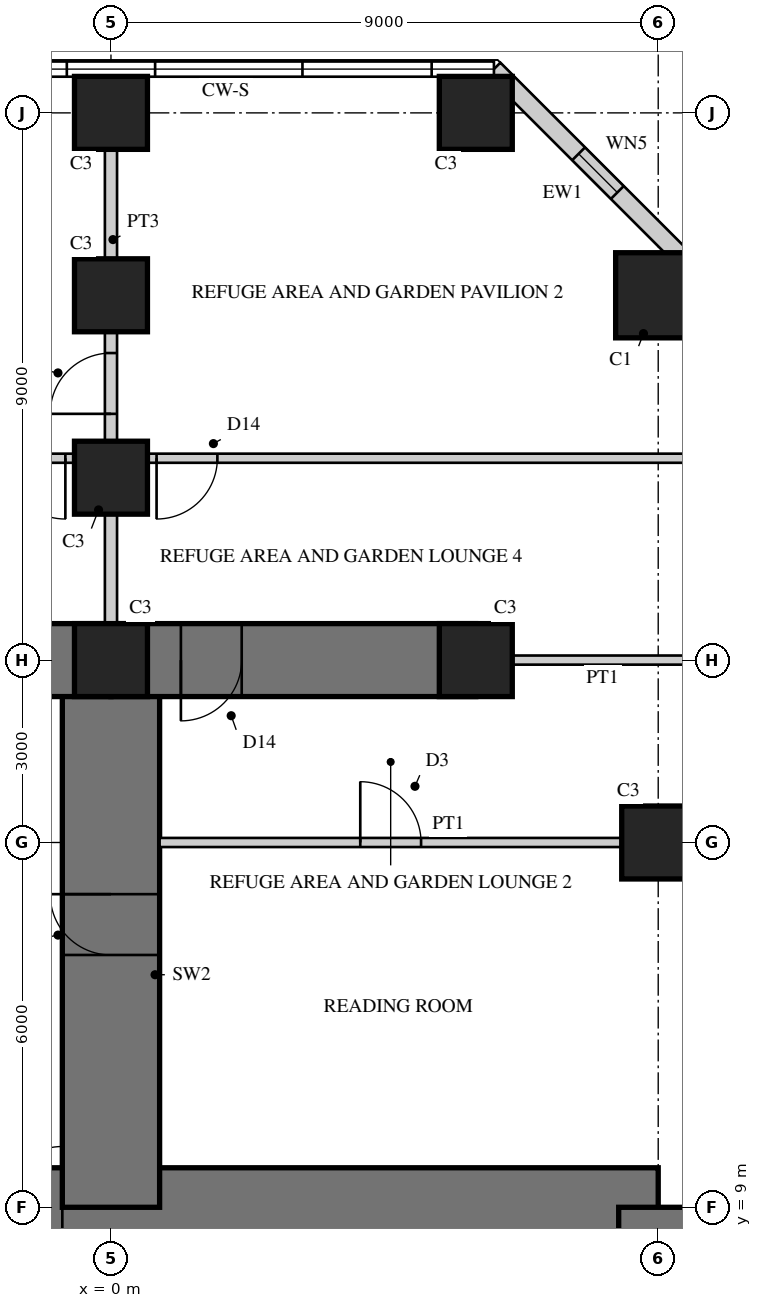
"""IFC4 building model, lengths in metres.
Left out: names, types, materials, properties, quantities, classifications, styles, units other than length and angle.
Written with IfcOpenShell. Run it as: python <this file> out.ifc"""

import sys

from ifc_helpers import new_model, si_unit, direction, frame, frame_2d, origin, origin_2d, place, context, subcontext, project, spatial, rectangle, hollow_rectangle, extrude, element, fill, save


model = new_model("IFC4")
c1 = context("Model", 3, precision=1e-05, world=origin(), true_north=direction((0.0, 1.0)))
c2 = subcontext(c1, "Body", "Model", "MODEL_VIEW")
j1 = project(units=[si_unit("LENGTHUNIT", "METRE"), si_unit("PLANEANGLEUNIT", "RADIAN")], contexts=[c1])
p1 = place(None, origin())
s1 = spatial("IfcSite", under=j1, at=p1, CompositionType="ELEMENT")
p2 = place(p1, origin())
s2 = spatial("IfcBuilding", under=s1, at=p2, CompositionType="ELEMENT")
p3 = place(p2, frame((0.0, 0.0, 95.5)))
s3 = spatial("IfcBuildingStorey", under=s2, at=p3, CompositionType="ELEMENT", Elevation=95.5)
p4 = place(p3, frame((9.0, 9.0, 0.0), z_axis=(0.0, 0.0, 1.0), x_axis=(-1.0, 0.0, 0.0)))
e1 = element("IfcWall", 1, at=p4, inside=s3, PredefinedType="SHEAR", context=c2, shape_type="SweptSolid", body=[
    extrude(rectangle(XDim=18.0, YDim=1.3, at=frame_2d((9.0, 0.0))), origin(), (0.0, 0.0, 1.0), 5.0),
])
p5 = place(p4, frame((9.8, 0.0, 0.0)))
e2 = element("IfcOpeningElement", 2, at=p5, cuts=e1, PredefinedType="OPENING", context=c2, shape_type="SweptSolid", body=[
    extrude(rectangle(XDim=1.0, YDim=2.4, at=frame_2d((0.5, 1.2))), frame((0.0, 0.66, 0.0), z_axis=(0.0, -1.0, 0.0), x_axis=(1.0, 0.0, 0.0)), (0.0, 0.0, 1.0), 1.32),
])
p6 = place(p3, frame((9.0, -9.0, 0.0), z_axis=(0.0, 0.0, 1.0), x_axis=(0.0, 1.0, 0.0)))
e3 = element("IfcWall", 3, at=p6, inside=s3, PredefinedType="SHEAR", context=c2, shape_type="SweptSolid", body=[
    extrude(rectangle(XDim=18.0, YDim=1.3, at=frame_2d((9.0, 0.0))), origin(), (0.0, 0.0, 1.0), 5.0),
])
p7 = place(p6, frame((9.8, 0.0, 0.0)))
e4 = element("IfcOpeningElement", 4, at=p7, cuts=e3, PredefinedType="OPENING", context=c2, shape_type="SweptSolid", body=[
    extrude(rectangle(XDim=1.0, YDim=2.4, at=frame_2d((0.5, 1.2))), frame((0.0, 0.66, 0.0), z_axis=(0.0, -1.0, 0.0), x_axis=(1.0, 0.0, 0.0)), (0.0, 0.0, 1.0), 1.32),
])
p8 = place(p3, frame((0.0, 9.0, 0.0), z_axis=(0.0, 0.0, 1.0), x_axis=(0.0, 1.0, 0.0)))
e5 = element("IfcWall", 5, at=p8, inside=s3, PredefinedType="SHEAR", context=c2, shape_type="SweptSolid", body=[
    extrude(rectangle(XDim=9.0, YDim=1.6, at=frame_2d((4.5, 0.0))), origin(), (0.0, 0.0, 1.0), 5.0),
])
p9 = place(p8, frame((4.15, 0.0, 0.0)))
e6 = element("IfcOpeningElement", 6, at=p9, cuts=e5, PredefinedType="OPENING", context=c2, shape_type="SweptSolid", body=[
    extrude(rectangle(XDim=1.0, YDim=2.2, at=frame_2d((0.5, 1.1))), frame((0.0, 0.81, 0.0), z_axis=(0.0, -1.0, 0.0), x_axis=(1.0, 0.0, 0.0)), (0.0, 0.0, 1.0), 1.62),
])
p10 = place(p3, frame((0.0, 18.0, 0.0), z_axis=(0.0, 0.0, 1.0), x_axis=(-1.0, 0.0, 0.0)))
e7 = element("IfcWall", 7, at=p10, inside=s3, PredefinedType="SHEAR", context=c2, shape_type="SweptSolid", body=[
    extrude(rectangle(XDim=6.0, YDim=1.2, at=frame_2d((3.0, 0.0))), origin(), (0.0, 0.0, 1.0), 5.0),
])
p11 = place(p10, frame((1.15, 0.0, 0.0)))
e8 = element("IfcOpeningElement", 8, at=p11, cuts=e7, PredefinedType="OPENING", context=c2, shape_type="SweptSolid", body=[
    extrude(rectangle(XDim=1.0, YDim=2.2, at=frame_2d((0.5, 1.1))), frame((0.0, 0.61, 0.0), z_axis=(0.0, -1.0, 0.0), x_axis=(1.0, 0.0, 0.0)), (0.0, 0.0, 1.0), 1.22),
])
p12 = place(p3, frame((0.0, 18.0, 0.0), z_axis=(0.0, 0.0, 1.0), x_axis=(1.0, 0.0, 0.0)))
e9 = element("IfcWall", 9, at=p12, inside=s3, PredefinedType="SHEAR", context=c2, shape_type="SweptSolid", body=[
    extrude(rectangle(XDim=6.0, YDim=1.2, at=frame_2d((3.0, 0.0))), origin(), (0.0, 0.0, 1.0), 5.0),
])
p13 = place(p12, frame((1.15, 0.0, 0.0)))
e10 = element("IfcOpeningElement", 10, at=p13, cuts=e9, PredefinedType="OPENING", context=c2, shape_type="SweptSolid", body=[
    extrude(rectangle(XDim=1.0, YDim=2.2, at=frame_2d((0.5, 1.1))), frame((0.0, 0.61, 0.0), z_axis=(0.0, -1.0, 0.0), x_axis=(1.0, 0.0, 0.0)), (0.0, 0.0, 1.0), 1.22),
])
p14 = place(p3, frame((9.0, 15.0, 0.0), z_axis=(0.0, 0.0, 1.0), x_axis=(1.0, 0.0, 0.0)))
e11 = element("IfcColumn", 11, at=p14, inside=s3, PredefinedType="COLUMN", context=c2, shape_type="SweptSolid", body=[
    extrude(rectangle(XDim=1.2, YDim=1.2, at=origin_2d()), origin(), (0.0, 0.0, 1.0), 5.0),
])
p15 = place(p3, frame((9.0, 24.0, 0.0), z_axis=(0.0, 0.0, 1.0), x_axis=(1.0, 0.0, 0.0)))
e12 = element("IfcColumn", 12, at=p15, inside=s3, PredefinedType="COLUMN", context=c2, shape_type="SweptSolid", body=[
    extrude(rectangle(XDim=1.4, YDim=1.4, at=origin_2d()), origin(), (0.0, 0.0, 1.0), 5.0),
])
for number, where, z_axis, x_axis in (
    (13, (6.0, 27.0, 0.0), (0.0, 0.0, 1.0), (1.0, 0.0, 0.0)),
    (14, (0.0, 27.0, 0.0), (0.0, 0.0, 1.0), (1.0, 0.0, 0.0)),
    (15, (6.0, 18.0, 0.0), (0.0, 0.0, 1.0), (1.0, 0.0, 0.0)),
    (16, (0.0, 18.0, 0.0), (0.0, 0.0, 1.0), (1.0, 0.0, 0.0)),
    (17, (0.0, 21.0, 0.0), (0.0, 0.0, 1.0), (1.0, 0.0, 0.0)),
    (18, (0.0, 24.0, 0.0), (0.0, 0.0, 1.0), (1.0, 0.0, 0.0)),
):
    element("IfcColumn", number, at=place(p3, frame(where, z_axis=z_axis, x_axis=x_axis)), inside=s3, PredefinedType="COLUMN", context=c2, shape_type="SweptSolid", body=[
        extrude(rectangle(XDim=1.2, YDim=1.2, at=origin_2d()), origin(), (0.0, 0.0, 1.0), 5.0),
    ])
p16 = place(p3, frame((9.72, 24.298, 0.0), z_axis=(0.0, 0.0, 1.0), x_axis=(-0.707106781187, 0.707106781187, 0.0)))
e19 = element("IfcWall", 19, at=p16, inside=s3, PredefinedType="SOLIDWALL", context=c2, shape_type="SweptSolid", body=[
    extrude(rectangle(XDim=4.839, YDim=0.3, at=frame_2d((2.419, 0.0))), origin(), (0.0, 0.0, 1.0), 4.8),
])
p17 = place(p16, frame((1.969, 0.0, 0.3)))
e20 = element("IfcOpeningElement", 20, at=p17, cuts=e19, PredefinedType="OPENING", context=c2, shape_type="SweptSolid", body=[
    extrude(rectangle(XDim=0.9, YDim=2.4, at=frame_2d((0.45, 1.2))), frame((0.0, 0.16, 0.0), z_axis=(0.0, -1.0, 0.0), x_axis=(1.0, 0.0, 0.0)), (0.0, 0.0, 1.0), 0.32),
])
p18 = place(p3, frame((8.4, 15.0, 0.0), z_axis=(0.0, 0.0, 1.0), x_axis=(-1.0, 0.0, 0.0)))
e21 = element("IfcWall", 21, at=p18, inside=s3, PredefinedType="PARTITIONING", context=c2, shape_type="SweptSolid", body=[
    extrude(rectangle(XDim=7.6, YDim=0.15, at=frame_2d((3.8, 0.0))), origin(), (0.0, 0.0, 1.0), 3.95),
])
p19 = place(p18, frame((3.3, 0.0, 0.0)))
e22 = element("IfcOpeningElement", 22, at=p19, cuts=e21, PredefinedType="OPENING", context=c2, shape_type="SweptSolid", body=[
    extrude(rectangle(XDim=1.0, YDim=2.1, at=frame_2d((0.5, 1.05))), frame((0.0, 0.085, 0.0), z_axis=(0.0, -1.0, 0.0), x_axis=(1.0, 0.0, 0.0)), (0.0, 0.0, 1.0), 0.17),
])
p20 = place(p3, frame((-0.1, 21.32, 0.0), z_axis=(0.0, 0.0, 1.0), x_axis=(-1.0, 0.0, 0.0)))
e23 = element("IfcWall", 23, at=p20, inside=s3, PredefinedType="PARTITIONING", context=c2, shape_type="SweptSolid", body=[
    extrude(rectangle(XDim=9.47, YDim=0.15, at=frame_2d((4.735, 0.0))), origin(), (0.0, 0.0, 1.0), 4.8),
])
p21 = place(p20, frame((0.65, 0.0, 0.0)))
e24 = element("IfcOpeningElement", 24, at=p21, cuts=e23, PredefinedType="OPENING", context=c2, shape_type="SweptSolid", body=[
    extrude(rectangle(XDim=1.0, YDim=2.2, at=frame_2d((0.5, 1.1))), frame((0.0, 0.085, 0.0), z_axis=(0.0, -1.0, 0.0), x_axis=(1.0, 0.0, 0.0)), (0.0, 0.0, 1.0), 0.17),
])
p22 = place(p3, frame((9.57, 21.32, 0.0), z_axis=(0.0, 0.0, 1.0), x_axis=(-1.0, 0.0, 0.0)))
e25 = element("IfcWall", 25, at=p22, inside=s3, PredefinedType="PARTITIONING", context=c2, shape_type="SweptSolid", body=[
    extrude(rectangle(XDim=9.47, YDim=0.15, at=frame_2d((4.735, 0.0))), origin(), (0.0, 0.0, 1.0), 4.8),
])
p23 = place(p22, frame((7.82, 0.0, 0.0)))
e26 = element("IfcOpeningElement", 26, at=p23, cuts=e25, PredefinedType="OPENING", context=c2, shape_type="SweptSolid", body=[
    extrude(rectangle(XDim=1.0, YDim=2.2, at=frame_2d((0.5, 1.1))), frame((0.0, 0.085, 0.0), z_axis=(0.0, -1.0, 0.0), x_axis=(1.0, 0.0, 0.0)), (0.0, 0.0, 1.0), 0.17),
])
p24 = place(p3, frame((9.57, 18.0, 0.0), z_axis=(0.0, 0.0, 1.0), x_axis=(-1.0, 0.0, 0.0)))
e27 = element("IfcWall", 27, at=p24, inside=s3, PredefinedType="PARTITIONING", context=c2, shape_type="SweptSolid", body=[
    extrude(rectangle(XDim=2.97, YDim=0.15, at=frame_2d((1.485, 0.0))), origin(), (0.0, 0.0, 1.0), 4.8),
])
p25 = place(p3, frame((0.0, 18.0, 0.0), z_axis=(0.0, 0.0, 1.0), x_axis=(0.0, 1.0, 0.0)))
e28 = element("IfcWall", 28, at=p25, inside=s3, PredefinedType="SOLIDWALL", context=c2, shape_type="SweptSolid", body=[
    extrude(rectangle(XDim=3.0, YDim=0.2, at=frame_2d((1.5, 0.0))), origin(), (0.0, 0.0, 1.0), 4.8),
])
p26 = place(p3, frame((0.0, 21.0, 0.0), z_axis=(0.0, 0.0, 1.0), x_axis=(0.0, 1.0, 0.0)))
e29 = element("IfcWall", 29, at=p26, inside=s3, PredefinedType="SOLIDWALL", context=c2, shape_type="SweptSolid", body=[
    extrude(rectangle(XDim=6.0, YDim=0.2, at=frame_2d((3.0, 0.0))), origin(), (0.0, 0.0, 1.0), 3.9),
])
p27 = place(p26, frame((1.05, 0.0, 0.0)))
e30 = element("IfcOpeningElement", 30, at=p27, cuts=e29, PredefinedType="OPENING", context=c2, shape_type="SweptSolid", body=[
    extrude(rectangle(XDim=1.0, YDim=2.2, at=frame_2d((0.5, 1.1))), frame((0.0, 0.11, 0.0), z_axis=(0.0, -1.0, 0.0), x_axis=(1.0, 0.0, 0.0)), (0.0, 0.0, 1.0), 0.22),
])
p28 = place(p17, origin())
e31 = element("IfcWindow", 31, at=p28, inside=s3, PartitioningType="SINGLE_PANEL", PredefinedType="WINDOW", context=c2, shape_type="SweptSolid", body=[
    extrude(hollow_rectangle(XDim=0.9, YDim=2.4, WallThickness=0.06, at=frame_2d((0.45, 1.2))), frame((0.0, 0.03, 0.0), z_axis=(0.0, -1.0, 0.0), x_axis=(1.0, 0.0, 0.0)), (0.0, 0.0, 1.0), 0.06),
    extrude(rectangle(XDim=0.779, YDim=2.279, at=frame_2d((0.45, 1.2))), frame((0.0, 0.03, 0.0), z_axis=(0.0, -1.0, 0.0), x_axis=(1.0, 0.0, 0.0)), (0.0, 0.0, 1.0), 0.06),
])
fill(e20, e31)
p29 = place(p19, frame((1.0, 0.0, 0.0), z_axis=(0.0, 0.0, 1.0), x_axis=(-1.0, 0.0, 0.0)))
e32 = element("IfcDoor", 32, at=p29, inside=s3, OperationType="SINGLE_SWING_LEFT", PredefinedType="DOOR", context=c2, shape_type="SweptSolid", body=[
    extrude(rectangle(XDim=1.0, YDim=2.1, at=frame_2d((0.5, 1.05))), frame((0.0, 0.025, 0.0), z_axis=(0.0, -1.0, 0.0), x_axis=(1.0, 0.0, 0.0)), (0.0, 0.0, 1.0), 0.05),
])
fill(e22, e32)
p30 = place(p21, origin())
e33 = element("IfcDoor", 33, at=p30, inside=s3, OperationType="SINGLE_SWING_LEFT", PredefinedType="DOOR", context=c2, shape_type="SweptSolid", body=[
    extrude(rectangle(XDim=1.0, YDim=2.2, at=frame_2d((0.5, 1.1))), frame((0.0, 0.025, 0.0), z_axis=(0.0, -1.0, 0.0), x_axis=(1.0, 0.0, 0.0)), (0.0, 0.0, 1.0), 0.05),
])
fill(e24, e33)
p31 = place(p23, origin())
e34 = element("IfcDoor", 34, at=p31, inside=s3, OperationType="SINGLE_SWING_RIGHT", PredefinedType="DOOR", context=c2, shape_type="SweptSolid", body=[
    extrude(rectangle(XDim=1.0, YDim=2.2, at=frame_2d((0.5, 1.1))), frame((0.0, 0.025, 0.0), z_axis=(0.0, -1.0, 0.0), x_axis=(1.0, 0.0, 0.0)), (0.0, 0.0, 1.0), 0.05),
])
fill(e26, e34)
p32 = place(p9, origin())
e35 = element("IfcDoor", 35, at=p32, inside=s3, OperationType="SINGLE_SWING_RIGHT", PredefinedType="DOOR", context=c2, shape_type="SweptSolid", body=[
    extrude(rectangle(XDim=1.0, YDim=2.2, at=frame_2d((0.5, 1.1))), frame((0.0, 0.025, 0.0), z_axis=(0.0, -1.0, 0.0), x_axis=(1.0, 0.0, 0.0)), (0.0, 0.0, 1.0), 0.05),
])
fill(e6, e35)
p33 = place(p27, origin())
e36 = element("IfcDoor", 36, at=p33, inside=s3, OperationType="SINGLE_SWING_LEFT", PredefinedType="DOOR", context=c2, shape_type="SweptSolid", body=[
    extrude(rectangle(XDim=1.0, YDim=2.2, at=frame_2d((0.5, 1.1))), frame((0.0, 0.025, 0.0), z_axis=(0.0, -1.0, 0.0), x_axis=(1.0, 0.0, 0.0)), (0.0, 0.0, 1.0), 0.05),
])
fill(e30, e36)
p34 = place(p13, frame((1.0, 0.0, 0.0), z_axis=(0.0, 0.0, 1.0), x_axis=(-1.0, 0.0, 0.0)))
e37 = element("IfcDoor", 37, at=p34, inside=s3, OperationType="SINGLE_SWING_RIGHT", PredefinedType="DOOR", context=c2, shape_type="SweptSolid", body=[
    extrude(rectangle(XDim=1.0, YDim=2.2, at=frame_2d((0.5, 1.1))), frame((0.0, 0.025, 0.0), z_axis=(0.0, -1.0, 0.0), x_axis=(1.0, 0.0, 0.0)), (0.0, 0.0, 1.0), 0.05),
])
fill(e10, e37)
p35 = place(p5, frame((1.0, 0.0, 0.0), z_axis=(0.0, 0.0, 1.0), x_axis=(-1.0, 0.0, 0.0)))
e38 = element("IfcDoor", 38, at=p35, inside=s3, OperationType="SINGLE_SWING_RIGHT", PredefinedType="DOOR", context=c2, shape_type="SweptSolid", body=[
    extrude(rectangle(XDim=1.0, YDim=2.4, at=frame_2d((0.5, 1.2))), frame((0.0, -0.005, 0.0), z_axis=(0.0, -1.0, 0.0), x_axis=(1.0, 0.0, 0.0)), (0.0, 0.0, 1.0), 0.05),
])
fill(e2, e38)
save(model, sys.argv[1])
